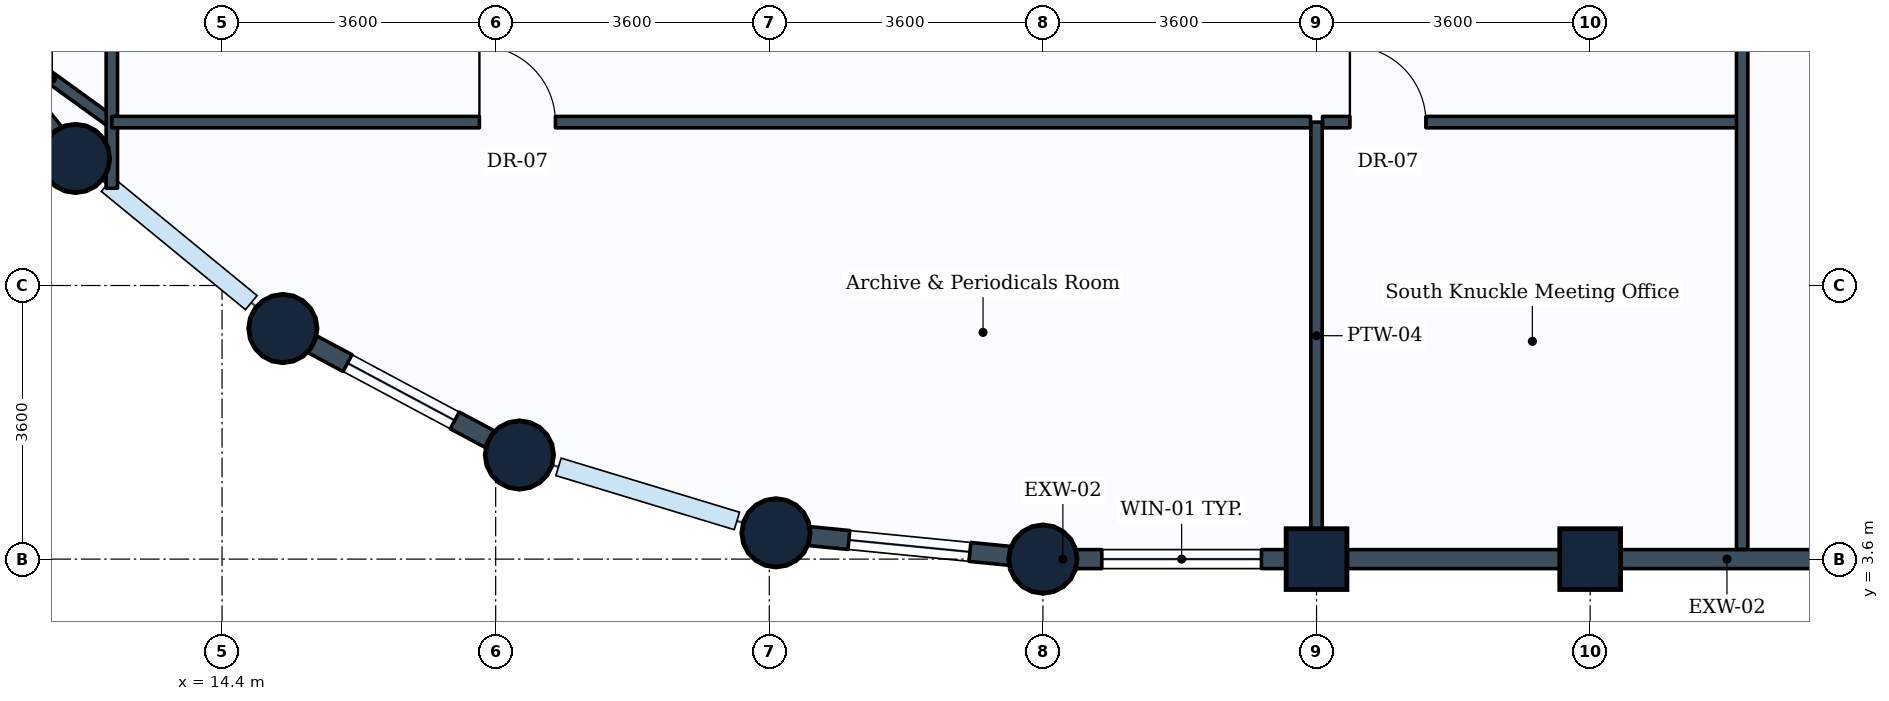
"""IFC4 building model, lengths in metres.
Left out: names, types, materials, properties, quantities, classifications, styles, units other than length and angle.
Written with IfcOpenShell. Run it as: python <this file> out.ifc"""

import sys

from ifc_helpers import new_model, si_unit, direction, frame, frame_2d, origin, origin_2d, place, context, subcontext, project, spatial, rectangle, circle, extrude, element, fill, save


model = new_model("IFC4")
c1 = context("Model", 3, precision=1e-05, world=origin(), true_north=direction((0.0, 1.0)))
c2 = subcontext(c1, "Body", "Model", "MODEL_VIEW")
j1 = project(units=[si_unit("LENGTHUNIT", "METRE"), si_unit("PLANEANGLEUNIT", "RADIAN")], contexts=[c1])
p1 = place(None, origin())
s1 = spatial("IfcSite", under=j1, at=p1, CompositionType="ELEMENT")
p2 = place(p1, origin())
s2 = spatial("IfcBuilding", under=s1, at=p2, CompositionType="ELEMENT")
p3 = place(p2, frame((0.0, 0.0, 263.0)))
s3 = spatial("IfcBuildingStorey", under=s2, at=p3, CompositionType="ELEMENT", Elevation=263.0)
for number, where, z_axis, x_axis in (
    (1, (12.472, 8.872, 0.0), (0.0, 0.0, 1.0), (1.0, 0.0, 0.0)),
    (2, (15.2, 6.634, 0.0), (0.0, 0.0, 1.0), (1.0, 0.0, 0.0)),
    (3, (18.312, 4.97, 0.0), (0.0, 0.0, 1.0), (1.0, 0.0, 0.0)),
    (4, (21.688, 3.946, 0.0), (0.0, 0.0, 1.0), (1.0, 0.0, 0.0)),
    (5, (25.2, 3.6, 0.0), (0.0, 0.0, 1.0), (1.0, 0.0, 0.0)),
):
    element("IfcColumn", number, at=place(p3, frame(where, z_axis=z_axis, x_axis=x_axis)), inside=s3, PredefinedType="COLUMN", context=c2, shape_type="SweptSolid", body=[
        extrude(circle(Radius=0.45, at=origin_2d()), origin(), (0.0, 0.0, 1.0), 3.6),
    ])
for number, where, z_axis, x_axis in (
    (6, (28.8, 3.6, 0.0), (0.0, 0.0, 1.0), (1.0, 0.0, 0.0)),
    (7, (32.4, 3.6, 0.0), (0.0, 0.0, 1.0), (1.0, 0.0, 0.0)),
):
    element("IfcColumn", number, at=place(p3, frame(where, z_axis=z_axis, x_axis=x_axis)), inside=s3, PredefinedType="COLUMN", context=c2, shape_type="SweptSolid", body=[
        extrude(rectangle(XDim=0.8, YDim=0.8, at=origin_2d()), origin(), (0.0, 0.0, 1.0), 3.6),
    ])
p4 = place(p3, frame((28.8, 3.6, 0.0), z_axis=(0.0, 0.0, 1.0), x_axis=(-1.0, 0.0, 0.0)))
e8 = element("IfcWall", 8, at=p4, inside=s3, PredefinedType="STANDARD", context=c2, shape_type="SweptSolid", body=[
    extrude(rectangle(XDim=3.6, YDim=0.25, at=frame_2d((1.8, 0.0))), origin(), (0.0, 0.0, 1.0), 2.83),
])
p5 = place(p4, frame((0.725, 0.0, 0.85)))
e9 = element("IfcOpeningElement", 9, at=p5, cuts=e8, PredefinedType="OPENING", context=c2, shape_type="SweptSolid", body=[
    extrude(rectangle(XDim=2.1, YDim=1.35, at=frame_2d((1.05, 0.675))), frame((0.0, 0.135, 0.0), z_axis=(0.0, -1.0, 0.0), x_axis=(1.0, 0.0, 0.0)), (0.0, 0.0, 1.0), 0.27),
])
p6 = place(p3, frame((32.4, 3.6, 0.0), z_axis=(0.0, 0.0, 1.0), x_axis=(-1.0, 0.0, 0.0)))
e10 = element("IfcWall", 10, at=p6, inside=s3, PredefinedType="STANDARD", context=c2, shape_type="SweptSolid", body=[
    extrude(rectangle(XDim=3.6, YDim=0.25, at=frame_2d((1.8, 0.0))), origin(), (0.0, 0.0, 1.0), 2.83),
])
p7 = place(p3, frame((36.0, 3.6, 0.0), z_axis=(0.0, 0.0, 1.0), x_axis=(-1.0, 0.0, 0.0)))
e11 = element("IfcWall", 11, at=p7, inside=s3, PredefinedType="STANDARD", context=c2, shape_type="SweptSolid", body=[
    extrude(rectangle(XDim=3.6, YDim=0.25, at=frame_2d((1.8, 0.0))), origin(), (0.0, 0.0, 1.0), 2.83),
])
p8 = place(p3, frame((12.472, 8.872, 0.0), z_axis=(0.0, 0.0, 1.0), x_axis=(-0.634258295121, 0.773121216285, 0.0)))
e12 = element("IfcWall", 12, at=p8, inside=s3, PredefinedType="STANDARD", context=c2, shape_type="SweptSolid", body=[
    extrude(rectangle(XDim=3.529, YDim=0.25, at=frame_2d((1.764, 0.0))), origin(), (0.0, 0.0, 1.0), 2.83),
])
p9 = place(p3, frame((18.312, 4.97, 0.0), z_axis=(0.0, 0.0, 1.0), x_axis=(-0.881846862014, 0.471535907389, 0.0)))
e13 = element("IfcWall", 13, at=p9, inside=s3, PredefinedType="STANDARD", context=c2, shape_type="SweptSolid", body=[
    extrude(rectangle(XDim=3.529, YDim=0.25, at=frame_2d((1.765, 0.0))), origin(), (0.0, 0.0, 1.0), 2.83),
])
p10 = place(p9, frame((0.964, 0.0, 0.85)))
e14 = element("IfcOpeningElement", 14, at=p10, cuts=e13, PredefinedType="OPENING", context=c2, shape_type="SweptSolid", body=[
    extrude(rectangle(XDim=1.6, YDim=1.35, at=frame_2d((0.8, 0.675))), frame((0.0, 0.135, 0.0), z_axis=(0.0, -1.0, 0.0), x_axis=(1.0, 0.0, 0.0)), (0.0, 0.0, 1.0), 0.27),
])
p11 = place(p3, frame((25.2, 3.6, 0.0), z_axis=(0.0, 0.0, 1.0), x_axis=(-0.995183369056, 0.098030923459, 0.0)))
e15 = element("IfcWall", 15, at=p11, inside=s3, PredefinedType="STANDARD", context=c2, shape_type="SweptSolid", body=[
    extrude(rectangle(XDim=3.529, YDim=0.25, at=frame_2d((1.765, 0.0))), origin(), (0.0, 0.0, 1.0), 2.83),
])
p12 = place(p11, frame((0.965, 0.0, 0.85)))
e16 = element("IfcOpeningElement", 16, at=p12, cuts=e15, PredefinedType="OPENING", context=c2, shape_type="SweptSolid", body=[
    extrude(rectangle(XDim=1.6, YDim=1.35, at=frame_2d((0.8, 0.675))), frame((0.0, 0.135, 0.0), z_axis=(0.0, -1.0, 0.0), x_axis=(1.0, 0.0, 0.0)), (0.0, 0.0, 1.0), 0.27),
])
p13 = place(p3, frame((28.8, 9.35, 0.0), z_axis=(0.0, 0.0, 1.0), x_axis=(0.0, -1.0, 0.0)))
e17 = element("IfcWall", 17, at=p13, inside=s3, PredefinedType="PARTITIONING", context=c2, shape_type="SweptSolid", body=[
    extrude(rectangle(XDim=5.621, YDim=0.15, at=frame_2d((2.811, 0.0))), origin(), (0.0, 0.0, 1.0), 3.335),
])
p14 = place(p3, frame((12.95, 9.35, 0.0), z_axis=(0.0, 0.0, 1.0), x_axis=(-0.8106792284, 0.585490553844, 0.0)))
e18 = element("IfcWall", 18, at=p14, inside=s3, PredefinedType="PARTITIONING", context=c2, shape_type="SweptSolid", body=[
    extrude(rectangle(XDim=1.93, YDim=0.15, at=frame_2d((0.965, 0.0))), origin(), (0.0, 0.0, 1.0), 2.83),
])
p15 = place(p3, frame((12.95, 8.48, 0.0), z_axis=(0.0, 0.0, 1.0), x_axis=(0.0, 1.0, 0.0)))
e19 = element("IfcWall", 19, at=p15, inside=s3, PredefinedType="PARTITIONING", context=c2, shape_type="SweptSolid", body=[
    extrude(rectangle(XDim=7.781, YDim=0.15, at=frame_2d((3.89, 0.0))), origin(), (0.0, 0.0, 1.0), 2.83),
])
p16 = place(p15, frame((5.101, 0.0, 0.0)))
e20 = element("IfcOpeningElement", 20, at=p16, cuts=e19, PredefinedType="OPENING", context=c2, shape_type="SweptSolid", body=[
    extrude(rectangle(XDim=1.0, YDim=2.1, at=frame_2d((0.5, 1.05))), frame((0.0, 0.085, 0.0), z_axis=(0.0, -1.0, 0.0), x_axis=(1.0, 0.0, 0.0)), (0.0, 0.0, 1.0), 0.17),
])
p17 = place(p3, frame((12.95, 9.35, 0.0), z_axis=(0.0, 0.0, 1.0), x_axis=(1.0, 0.0, 0.0)))
e21 = element("IfcWall", 21, at=p17, inside=s3, PredefinedType="PARTITIONING", context=c2, shape_type="SweptSolid", body=[
    extrude(rectangle(XDim=15.771, YDim=0.15, at=frame_2d((7.885, 0.0))), origin(), (0.0, 0.0, 1.0), 3.02),
])
p18 = place(p17, frame((4.836, 0.0, 0.0)))
e22 = element("IfcOpeningElement", 22, at=p18, cuts=e21, PredefinedType="OPENING", context=c2, shape_type="SweptSolid", body=[
    extrude(rectangle(XDim=1.0, YDim=2.1, at=frame_2d((0.5, 1.05))), frame((0.0, 0.085, 0.0), z_axis=(0.0, -1.0, 0.0), x_axis=(1.0, 0.0, 0.0)), (0.0, 0.0, 1.0), 0.17),
])
p19 = place(p3, frame((28.879, 9.35, 0.0), z_axis=(0.0, 0.0, 1.0), x_axis=(1.0, 0.0, 0.0)))
e23 = element("IfcWall", 23, at=p19, inside=s3, PredefinedType="PARTITIONING", context=c2, shape_type="SweptSolid", body=[
    extrude(rectangle(XDim=5.521, YDim=0.15, at=frame_2d((2.76, 0.0))), origin(), (0.0, 0.0, 1.0), 3.335),
])
p20 = place(p19, frame((0.36, 0.0, 0.0)))
e24 = element("IfcOpeningElement", 24, at=p20, cuts=e23, PredefinedType="OPENING", context=c2, shape_type="SweptSolid", body=[
    extrude(rectangle(XDim=1.0, YDim=2.1, at=frame_2d((0.5, 1.05))), frame((0.0, 0.085, 0.0), z_axis=(0.0, -1.0, 0.0), x_axis=(1.0, 0.0, 0.0)), (0.0, 0.0, 1.0), 0.17),
])
p21 = place(p3, frame((34.4, 3.729, 0.0), z_axis=(0.0, 0.0, 1.0), x_axis=(0.0, 1.0, 0.0)))
e25 = element("IfcWall", 25, at=p21, inside=s3, PredefinedType="PARTITIONING", context=c2, shape_type="SweptSolid", body=[
    extrude(rectangle(XDim=12.571, YDim=0.15, at=frame_2d((6.286, 0.0))), origin(), (0.0, 0.0, 1.0), 2.83),
])
p22 = place(p5, origin())
e26 = element("IfcWindow", 26, at=p22, inside=s3, PartitioningType="SINGLE_PANEL", PredefinedType="WINDOW", context=c2, shape_type="SweptSolid", body=[
    extrude(rectangle(XDim=2.1, YDim=1.35, at=frame_2d((1.05, 0.675))), frame((0.0, 0.03, 0.0), z_axis=(0.0, -1.0, 0.0), x_axis=(1.0, 0.0, 0.0)), (0.0, 0.0, 1.0), 0.06),
])
fill(e9, e26)
p23 = place(p10, origin())
e27 = element("IfcWindow", 27, at=p23, inside=s3, PartitioningType="SINGLE_PANEL", PredefinedType="WINDOW", context=c2, shape_type="SweptSolid", body=[
    extrude(rectangle(XDim=1.6, YDim=1.35, at=frame_2d((0.8, 0.675))), frame((0.0, 0.03, 0.0), z_axis=(0.0, -1.0, 0.0), x_axis=(1.0, 0.0, 0.0)), (0.0, 0.0, 1.0), 0.06),
])
fill(e14, e27)
p24 = place(p12, origin())
e28 = element("IfcWindow", 28, at=p24, inside=s3, PartitioningType="SINGLE_PANEL", PredefinedType="WINDOW", context=c2, shape_type="SweptSolid", body=[
    extrude(rectangle(XDim=1.6, YDim=1.35, at=frame_2d((0.8, 0.675))), frame((0.0, 0.03, 0.0), z_axis=(0.0, -1.0, 0.0), x_axis=(1.0, 0.0, 0.0)), (0.0, 0.0, 1.0), 0.06),
])
fill(e16, e28)
p25 = place(p18, origin())
e29 = element("IfcDoor", 29, at=p25, inside=s3, OperationType="SINGLE_SWING_LEFT", PredefinedType="DOOR", context=c2, shape_type="SweptSolid", body=[
    extrude(rectangle(XDim=1.0, YDim=2.1, at=frame_2d((0.5, 1.05))), frame((0.0, 0.025, 0.0), z_axis=(0.0, -1.0, 0.0), x_axis=(1.0, 0.0, 0.0)), (0.0, 0.0, 1.0), 0.05),
])
fill(e22, e29)
p26 = place(p20, origin())
e30 = element("IfcDoor", 30, at=p26, inside=s3, OperationType="SINGLE_SWING_LEFT", PredefinedType="DOOR", context=c2, shape_type="SweptSolid", body=[
    extrude(rectangle(XDim=1.0, YDim=2.1, at=frame_2d((0.5, 1.05))), frame((0.0, 0.025, 0.0), z_axis=(0.0, -1.0, 0.0), x_axis=(1.0, 0.0, 0.0)), (0.0, 0.0, 1.0), 0.05),
])
fill(e24, e30)
save(model, sys.argv[1])
